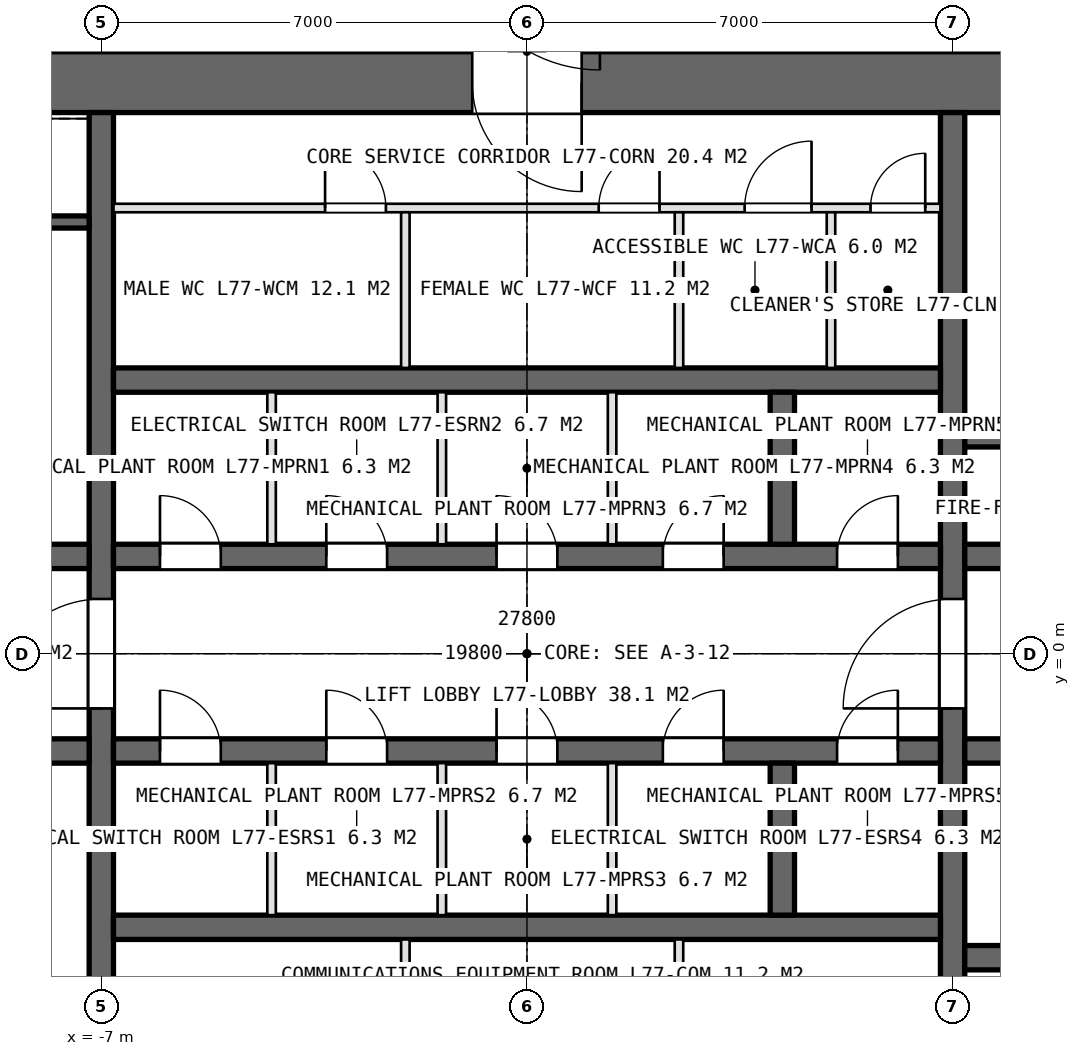
"""IFC4 building model, lengths in metres.
Left out: names, types, materials, properties, quantities, classifications, styles, units other than length and angle.
Written with IfcOpenShell. Run it as: python <this file> out.ifc"""

import sys

from ifc_helpers import new_model, si_unit, direction, frame, frame_2d, origin, place, context, subcontext, project, spatial, rectangle, extrude, element, fill, save


model = new_model("IFC4")
c1 = context("Model", 3, precision=1e-05, world=origin(), true_north=direction((0.0, 1.0)))
c2 = subcontext(c1, "Body", "Model", "MODEL_VIEW")
j1 = project(units=[si_unit("LENGTHUNIT", "METRE"), si_unit("PLANEANGLEUNIT", "RADIAN")], contexts=[c1])
p1 = place(None, origin())
s1 = spatial("IfcSite", under=j1, at=p1, CompositionType="ELEMENT")
p2 = place(p1, origin())
s2 = spatial("IfcBuilding", under=s1, at=p2, CompositionType="ELEMENT")
p3 = place(p2, frame((0.0, 0.0, 344.2)))
s3 = spatial("IfcBuildingStorey", under=s2, at=p3, CompositionType="ELEMENT", Elevation=344.2)
p4 = place(p3, frame((13.9, 9.4, 0.0), z_axis=(0.0, 0.0, 1.0), x_axis=(-1.0, 0.0, 0.0)))
e1 = element("IfcWall", 1, at=p4, inside=s3, PredefinedType="SHEAR", context=c2, shape_type="SweptSolid", body=[
    extrude(rectangle(XDim=27.8, YDim=1.0, at=frame_2d((13.9, 0.0))), origin(), (0.0, 0.0, 1.0), 5.0),
])
p5 = place(p4, frame((23.9, 0.0, 0.0)))
e2 = element("IfcOpeningElement", 2, at=p5, cuts=e1, PredefinedType="OPENING", context=c2, shape_type="SweptSolid", body=[
    extrude(rectangle(XDim=1.0, YDim=2.4, at=frame_2d((0.5, 1.2))), frame((0.0, 0.51, 0.0), z_axis=(0.0, -1.0, 0.0), x_axis=(1.0, 0.0, 0.0)), (0.0, 0.0, 1.0), 1.02),
])
p6 = place(p4, frame((13.0, 0.0, 0.0)))
e3 = element("IfcOpeningElement", 3, at=p6, cuts=e1, PredefinedType="OPENING", context=c2, shape_type="SweptSolid", body=[
    extrude(rectangle(XDim=1.8, YDim=2.4, at=frame_2d((0.9, 1.2))), frame((0.0, 0.51, 0.0), z_axis=(0.0, -1.0, 0.0), x_axis=(1.0, 0.0, 0.0)), (0.0, 0.0, 1.0), 1.02),
])
p7 = place(p3, frame((-7.0, -8.9, 0.0), z_axis=(0.0, 0.0, 1.0), x_axis=(0.0, 1.0, 0.0)))
e4 = element("IfcWall", 4, at=p7, inside=s3, PredefinedType="SHEAR", context=c2, shape_type="SweptSolid", body=[
    extrude(rectangle(XDim=17.8, YDim=0.4, at=frame_2d((8.9, 0.0))), origin(), (0.0, 0.0, 1.0), 5.0),
])
p8 = place(p7, frame((8.0, 0.0, 0.0)))
e5 = element("IfcOpeningElement", 5, at=p8, cuts=e4, PredefinedType="OPENING", context=c2, shape_type="SweptSolid", body=[
    extrude(rectangle(XDim=1.8, YDim=2.4, at=frame_2d((0.9, 1.2))), frame((0.0, 0.21, 0.0), z_axis=(0.0, -1.0, 0.0), x_axis=(1.0, 0.0, 0.0)), (0.0, 0.0, 1.0), 0.42),
])
p9 = place(p3, frame((7.0, -8.9, 0.0), z_axis=(0.0, 0.0, 1.0), x_axis=(0.0, 1.0, 0.0)))
e6 = element("IfcWall", 6, at=p9, inside=s3, PredefinedType="SHEAR", context=c2, shape_type="SweptSolid", body=[
    extrude(rectangle(XDim=17.8, YDim=0.4, at=frame_2d((8.9, 0.0))), origin(), (0.0, 0.0, 1.0), 5.0),
])
p10 = place(p9, frame((8.0, 0.0, 0.0)))
e7 = element("IfcOpeningElement", 7, at=p10, cuts=e6, PredefinedType="OPENING", context=c2, shape_type="SweptSolid", body=[
    extrude(rectangle(XDim=1.8, YDim=2.4, at=frame_2d((0.9, 1.2))), frame((0.0, 0.21, 0.0), z_axis=(0.0, -1.0, 0.0), x_axis=(1.0, 0.0, 0.0)), (0.0, 0.0, 1.0), 0.42),
])
p11 = place(p3, frame((-6.8, 1.6, 0.0), z_axis=(0.0, 0.0, 1.0), x_axis=(1.0, 0.0, 0.0)))
e8 = element("IfcWall", 8, at=p11, inside=s3, PredefinedType="SHEAR", context=c2, shape_type="SweptSolid", body=[
    extrude(rectangle(XDim=13.6, YDim=0.4, at=frame_2d((6.8, 0.0))), origin(), (0.0, 0.0, 1.0), 5.0),
])
p12 = place(p11, frame((0.765, 0.0, 0.0)))
e9 = element("IfcOpeningElement", 9, at=p12, cuts=e8, PredefinedType="OPENING", context=c2, shape_type="SweptSolid", body=[
    extrude(rectangle(XDim=1.0, YDim=2.4, at=frame_2d((0.5, 1.2))), frame((0.0, 0.21, 0.0), z_axis=(0.0, -1.0, 0.0), x_axis=(1.0, 0.0, 0.0)), (0.0, 0.0, 1.0), 0.42),
])
p13 = place(p11, frame((3.5, 0.0, 0.0)))
e10 = element("IfcOpeningElement", 10, at=p13, cuts=e8, PredefinedType="OPENING", context=c2, shape_type="SweptSolid", body=[
    extrude(rectangle(XDim=1.0, YDim=2.4, at=frame_2d((0.5, 1.2))), frame((0.0, 0.21, 0.0), z_axis=(0.0, -1.0, 0.0), x_axis=(1.0, 0.0, 0.0)), (0.0, 0.0, 1.0), 0.42),
])
p14 = place(p11, frame((6.3, 0.0, 0.0)))
e11 = element("IfcOpeningElement", 11, at=p14, cuts=e8, PredefinedType="OPENING", context=c2, shape_type="SweptSolid", body=[
    extrude(rectangle(XDim=1.0, YDim=2.4, at=frame_2d((0.5, 1.2))), frame((0.0, 0.21, 0.0), z_axis=(0.0, -1.0, 0.0), x_axis=(1.0, 0.0, 0.0)), (0.0, 0.0, 1.0), 0.42),
])
p15 = place(p11, frame((9.035, 0.0, 0.0)))
e12 = element("IfcOpeningElement", 12, at=p15, cuts=e8, PredefinedType="OPENING", context=c2, shape_type="SweptSolid", body=[
    extrude(rectangle(XDim=1.0, YDim=2.4, at=frame_2d((0.5, 1.2))), frame((0.0, 0.21, 0.0), z_axis=(0.0, -1.0, 0.0), x_axis=(1.0, 0.0, 0.0)), (0.0, 0.0, 1.0), 0.42),
])
p16 = place(p11, frame((11.9, 0.0, 0.0)))
e13 = element("IfcOpeningElement", 13, at=p16, cuts=e8, PredefinedType="OPENING", context=c2, shape_type="SweptSolid", body=[
    extrude(rectangle(XDim=1.0, YDim=2.4, at=frame_2d((0.5, 1.2))), frame((0.0, 0.21, 0.0), z_axis=(0.0, -1.0, 0.0), x_axis=(1.0, 0.0, 0.0)), (0.0, 0.0, 1.0), 0.42),
])
p17 = place(p3, frame((-6.8, -1.6, 0.0), z_axis=(0.0, 0.0, 1.0), x_axis=(1.0, 0.0, 0.0)))
e14 = element("IfcWall", 14, at=p17, inside=s3, PredefinedType="SHEAR", context=c2, shape_type="SweptSolid", body=[
    extrude(rectangle(XDim=13.6, YDim=0.4, at=frame_2d((6.8, 0.0))), origin(), (0.0, 0.0, 1.0), 5.0),
])
p18 = place(p17, frame((0.765, 0.0, 0.0)))
e15 = element("IfcOpeningElement", 15, at=p18, cuts=e14, PredefinedType="OPENING", context=c2, shape_type="SweptSolid", body=[
    extrude(rectangle(XDim=1.0, YDim=2.4, at=frame_2d((0.5, 1.2))), frame((0.0, 0.21, 0.0), z_axis=(0.0, -1.0, 0.0), x_axis=(1.0, 0.0, 0.0)), (0.0, 0.0, 1.0), 0.42),
])
p19 = place(p17, frame((3.5, 0.0, 0.0)))
e16 = element("IfcOpeningElement", 16, at=p19, cuts=e14, PredefinedType="OPENING", context=c2, shape_type="SweptSolid", body=[
    extrude(rectangle(XDim=1.0, YDim=2.4, at=frame_2d((0.5, 1.2))), frame((0.0, 0.21, 0.0), z_axis=(0.0, -1.0, 0.0), x_axis=(1.0, 0.0, 0.0)), (0.0, 0.0, 1.0), 0.42),
])
p20 = place(p17, frame((6.3, 0.0, 0.0)))
e17 = element("IfcOpeningElement", 17, at=p20, cuts=e14, PredefinedType="OPENING", context=c2, shape_type="SweptSolid", body=[
    extrude(rectangle(XDim=1.0, YDim=2.4, at=frame_2d((0.5, 1.2))), frame((0.0, 0.21, 0.0), z_axis=(0.0, -1.0, 0.0), x_axis=(1.0, 0.0, 0.0)), (0.0, 0.0, 1.0), 0.42),
])
p21 = place(p17, frame((9.035, 0.0, 0.0)))
e18 = element("IfcOpeningElement", 18, at=p21, cuts=e14, PredefinedType="OPENING", context=c2, shape_type="SweptSolid", body=[
    extrude(rectangle(XDim=1.0, YDim=2.4, at=frame_2d((0.5, 1.2))), frame((0.0, 0.21, 0.0), z_axis=(0.0, -1.0, 0.0), x_axis=(1.0, 0.0, 0.0)), (0.0, 0.0, 1.0), 0.42),
])
p22 = place(p17, frame((11.9, 0.0, 0.0)))
e19 = element("IfcOpeningElement", 19, at=p22, cuts=e14, PredefinedType="OPENING", context=c2, shape_type="SweptSolid", body=[
    extrude(rectangle(XDim=1.0, YDim=2.4, at=frame_2d((0.5, 1.2))), frame((0.0, 0.21, 0.0), z_axis=(0.0, -1.0, 0.0), x_axis=(1.0, 0.0, 0.0)), (0.0, 0.0, 1.0), 0.42),
])
for number, where, z_axis, x_axis in (
    (20, (-6.8, 4.5, 0.0), (0.0, 0.0, 1.0), (1.0, 0.0, 0.0)),
    (21, (-6.8, -4.5, 0.0), (0.0, 0.0, 1.0), (1.0, 0.0, 0.0)),
):
    element("IfcWall", number, at=place(p3, frame(where, z_axis=z_axis, x_axis=x_axis)), inside=s3, PredefinedType="SHEAR", context=c2, shape_type="SweptSolid", body=[
        extrude(rectangle(XDim=13.6, YDim=0.4, at=frame_2d((6.8, 0.0))), origin(), (0.0, 0.0, 1.0), 5.0),
    ])
for number, where, z_axis, x_axis in (
    (22, (-12.9, 1.6, 0.0), (0.0, 0.0, 1.0), (1.0, 0.0, 0.0)),
    (23, (-12.9, -1.6, 0.0), (0.0, 0.0, 1.0), (1.0, 0.0, 0.0)),
):
    element("IfcWall", number, at=place(p3, frame(where, z_axis=z_axis, x_axis=x_axis)), inside=s3, PredefinedType="SHEAR", context=c2, shape_type="SweptSolid", body=[
        extrude(rectangle(XDim=5.7, YDim=0.4, at=frame_2d((2.85, 0.0))), origin(), (0.0, 0.0, 1.0), 5.0),
    ])
p23 = place(p3, frame((7.2, 1.6, 0.0), z_axis=(0.0, 0.0, 1.0), x_axis=(1.0, 0.0, 0.0)))
e24 = element("IfcWall", 24, at=p23, inside=s3, PredefinedType="SHEAR", context=c2, shape_type="SweptSolid", body=[
    extrude(rectangle(XDim=5.7, YDim=0.4, at=frame_2d((2.85, 0.0))), origin(), (0.0, 0.0, 1.0), 5.0),
])
p24 = place(p23, frame((0.7, 0.0, 0.0)))
e25 = element("IfcOpeningElement", 25, at=p24, cuts=e24, PredefinedType="OPENING", context=c2, shape_type="SweptSolid", body=[
    extrude(rectangle(XDim=1.0, YDim=2.4, at=frame_2d((0.5, 1.2))), frame((0.0, 0.21, 0.0), z_axis=(0.0, -1.0, 0.0), x_axis=(1.0, 0.0, 0.0)), (0.0, 0.0, 1.0), 0.42),
])
p25 = place(p3, frame((7.2, -1.6, 0.0), z_axis=(0.0, 0.0, 1.0), x_axis=(1.0, 0.0, 0.0)))
e26 = element("IfcWall", 26, at=p25, inside=s3, PredefinedType="SHEAR", context=c2, shape_type="SweptSolid", body=[
    extrude(rectangle(XDim=5.7, YDim=0.4, at=frame_2d((2.85, 0.0))), origin(), (0.0, 0.0, 1.0), 5.0),
])
p26 = place(p25, frame((0.9, 0.0, 0.0)))
e27 = element("IfcOpeningElement", 27, at=p26, cuts=e26, PredefinedType="OPENING", context=c2, shape_type="SweptSolid", body=[
    extrude(rectangle(XDim=1.3, YDim=2.4, at=frame_2d((0.65, 1.2))), frame((0.0, 0.21, 0.0), z_axis=(0.0, -1.0, 0.0), x_axis=(1.0, 0.0, 0.0)), (0.0, 0.0, 1.0), 0.42),
])
p27 = place(p25, frame((3.95, 0.0, 0.0)))
e28 = element("IfcOpeningElement", 28, at=p27, cuts=e26, PredefinedType="OPENING", context=c2, shape_type="SweptSolid", body=[
    extrude(rectangle(XDim=1.3, YDim=2.4, at=frame_2d((0.65, 1.2))), frame((0.0, 0.21, 0.0), z_axis=(0.0, -1.0, 0.0), x_axis=(1.0, 0.0, 0.0)), (0.0, 0.0, 1.0), 0.42),
])
p28 = place(p3, frame((7.2, -5.0, 0.0), z_axis=(0.0, 0.0, 1.0), x_axis=(1.0, 0.0, 0.0)))
e29 = element("IfcWall", 29, at=p28, inside=s3, PredefinedType="SHEAR", context=c2, shape_type="SweptSolid", body=[
    extrude(rectangle(XDim=5.7, YDim=0.4, at=frame_2d((2.85, 0.0))), origin(), (0.0, 0.0, 1.0), 5.0),
])
for number, where, z_axis, x_axis in (
    (30, (4.2, 1.8, 0.0), (0.0, 0.0, 1.0), (0.0, 1.0, 0.0)),
    (31, (4.2, -4.3, 0.0), (0.0, 0.0, 1.0), (0.0, 1.0, 0.0)),
):
    element("IfcWall", number, at=place(p3, frame(where, z_axis=z_axis, x_axis=x_axis)), inside=s3, PredefinedType="SHEAR", context=c2, shape_type="SweptSolid", body=[
        extrude(rectangle(XDim=2.5, YDim=0.4, at=frame_2d((1.25, 0.0))), origin(), (0.0, 0.0, 1.0), 5.0),
    ])
p29 = place(p3, frame((-6.8, 7.33, 0.0), z_axis=(0.0, 0.0, 1.0), x_axis=(1.0, 0.0, 0.0)))
e32 = element("IfcWall", 32, at=p29, inside=s3, PredefinedType="PARTITIONING", context=c2, shape_type="SweptSolid", body=[
    extrude(rectangle(XDim=13.6, YDim=0.14, at=frame_2d((6.8, 0.0))), origin(), (0.0, 0.0, 1.0), 4.7),
])
p30 = place(p29, frame((3.48, 0.0, 0.0)))
e33 = element("IfcOpeningElement", 33, at=p30, cuts=e32, PredefinedType="OPENING", context=c2, shape_type="SweptSolid", body=[
    extrude(rectangle(XDim=1.0, YDim=2.4, at=frame_2d((0.5, 1.2))), frame((0.0, 0.08, 0.0), z_axis=(0.0, -1.0, 0.0), x_axis=(1.0, 0.0, 0.0)), (0.0, 0.0, 1.0), 0.16),
])
p31 = place(p29, frame((7.98, 0.0, 0.0)))
e34 = element("IfcOpeningElement", 34, at=p31, cuts=e32, PredefinedType="OPENING", context=c2, shape_type="SweptSolid", body=[
    extrude(rectangle(XDim=1.0, YDim=2.4, at=frame_2d((0.5, 1.2))), frame((0.0, 0.08, 0.0), z_axis=(0.0, -1.0, 0.0), x_axis=(1.0, 0.0, 0.0)), (0.0, 0.0, 1.0), 0.16),
])
p32 = place(p29, frame((10.38, 0.0, 0.0)))
e35 = element("IfcOpeningElement", 35, at=p32, cuts=e32, PredefinedType="OPENING", context=c2, shape_type="SweptSolid", body=[
    extrude(rectangle(XDim=1.1, YDim=2.4, at=frame_2d((0.55, 1.2))), frame((0.0, 0.08, 0.0), z_axis=(0.0, -1.0, 0.0), x_axis=(1.0, 0.0, 0.0)), (0.0, 0.0, 1.0), 0.16),
])
p33 = place(p29, frame((12.45, 0.0, 0.0)))
e36 = element("IfcOpeningElement", 36, at=p33, cuts=e32, PredefinedType="OPENING", context=c2, shape_type="SweptSolid", body=[
    extrude(rectangle(XDim=0.9, YDim=2.4, at=frame_2d((0.45, 1.2))), frame((0.0, 0.08, 0.0), z_axis=(0.0, -1.0, 0.0), x_axis=(1.0, 0.0, 0.0)), (0.0, 0.0, 1.0), 0.16),
])
for number, where, z_axis, x_axis in (
    (37, (-2.0, 4.7, 0.0), (0.0, 0.0, 1.0), (0.0, 1.0, 0.0)),
    (38, (2.5, 4.7, 0.0), (0.0, 0.0, 1.0), (0.0, 1.0, 0.0)),
    (39, (5.0, 4.7, 0.0), (0.0, 0.0, 1.0), (0.0, 1.0, 0.0)),
    (40, (-2.0, -4.7, 0.0), (0.0, 0.0, 1.0), (0.0, -1.0, 0.0)),
    (41, (2.5, -4.7, 0.0), (0.0, 0.0, 1.0), (0.0, -1.0, 0.0)),
):
    element("IfcWall", number, at=place(p3, frame(where, z_axis=z_axis, x_axis=x_axis)), inside=s3, PredefinedType="PARTITIONING", context=c2, shape_type="SweptSolid", body=[
        extrude(rectangle(XDim=2.56, YDim=0.14, at=frame_2d((1.28, 0.0))), origin(), (0.0, 0.0, 1.0), 4.7),
    ])
for number, where, z_axis, x_axis in (
    (42, (-4.2, 1.8, 0.0), (0.0, 0.0, 1.0), (0.0, 1.0, 0.0)),
    (43, (-1.4, 1.8, 0.0), (0.0, 0.0, 1.0), (0.0, 1.0, 0.0)),
    (44, (1.4, 1.8, 0.0), (0.0, 0.0, 1.0), (0.0, 1.0, 0.0)),
    (45, (-4.2, -1.8, 0.0), (0.0, 0.0, 1.0), (0.0, -1.0, 0.0)),
    (46, (-1.4, -1.8, 0.0), (0.0, 0.0, 1.0), (0.0, -1.0, 0.0)),
    (47, (1.4, -1.8, 0.0), (0.0, 0.0, 1.0), (0.0, -1.0, 0.0)),
):
    element("IfcWall", number, at=place(p3, frame(where, z_axis=z_axis, x_axis=x_axis)), inside=s3, PredefinedType="PARTITIONING", context=c2, shape_type="SweptSolid", body=[
        extrude(rectangle(XDim=2.5, YDim=0.14, at=frame_2d((1.25, 0.0))), origin(), (0.0, 0.0, 1.0), 4.7),
    ])
for number, where, z_axis, x_axis in (
    (48, (-9.15, 7.1, 0.0), (0.0, 0.0, 1.0), (1.0, 0.0, 0.0)),
    (49, (9.15, 3.5, 0.0), (0.0, 0.0, 1.0), (-1.0, 0.0, 0.0)),
):
    element("IfcWall", number, at=place(p3, frame(where, z_axis=z_axis, x_axis=x_axis)), inside=s3, PredefinedType="SOLIDWALL", context=c2, shape_type="SweptSolid", body=[
        extrude(rectangle(XDim=1.95, YDim=0.2, at=frame_2d((0.975, 0.0))), origin(), (0.0, 0.0, 1.0), 5.0),
    ])
p34 = place(p8, origin())
e50 = element("IfcDoor", 50, at=p34, inside=s3, OperationType="DOUBLE_DOOR_SINGLE_SWING", PredefinedType="DOOR", context=c2, shape_type="SweptSolid", body=[
    extrude(rectangle(XDim=1.8, YDim=2.4, at=frame_2d((0.9, 1.2))), frame((0.0, 0.025, 0.0), z_axis=(0.0, -1.0, 0.0), x_axis=(1.0, 0.0, 0.0)), (0.0, 0.0, 1.0), 0.05),
])
fill(e5, e50)
p35 = place(p10, origin())
e51 = element("IfcDoor", 51, at=p35, inside=s3, OperationType="DOUBLE_DOOR_SINGLE_SWING", PredefinedType="DOOR", context=c2, shape_type="SweptSolid", body=[
    extrude(rectangle(XDim=1.8, YDim=2.4, at=frame_2d((0.9, 1.2))), frame((0.0, 0.025, 0.0), z_axis=(0.0, -1.0, 0.0), x_axis=(1.0, 0.0, 0.0)), (0.0, 0.0, 1.0), 0.05),
])
fill(e7, e51)
p36 = place(p30, origin())
e52 = element("IfcDoor", 52, at=p36, inside=s3, OperationType="SINGLE_SWING_LEFT", PredefinedType="DOOR", context=c2, shape_type="SweptSolid", body=[
    extrude(rectangle(XDim=1.0, YDim=2.4, at=frame_2d((0.5, 1.2))), frame((0.0, 0.025, 0.0), z_axis=(0.0, -1.0, 0.0), x_axis=(1.0, 0.0, 0.0)), (0.0, 0.0, 1.0), 0.05),
])
fill(e33, e52)
p37 = place(p31, origin())
e53 = element("IfcDoor", 53, at=p37, inside=s3, OperationType="SINGLE_SWING_RIGHT", PredefinedType="DOOR", context=c2, shape_type="SweptSolid", body=[
    extrude(rectangle(XDim=1.0, YDim=2.4, at=frame_2d((0.5, 1.2))), frame((0.0, 0.025, 0.0), z_axis=(0.0, -1.0, 0.0), x_axis=(1.0, 0.0, 0.0)), (0.0, 0.0, 1.0), 0.05),
])
fill(e34, e53)
p38 = place(p32, origin())
e54 = element("IfcDoor", 54, at=p38, inside=s3, OperationType="SINGLE_SWING_RIGHT", PredefinedType="DOOR", context=c2, shape_type="SweptSolid", body=[
    extrude(rectangle(XDim=1.1, YDim=2.4, at=frame_2d((0.55, 1.2))), frame((0.0, 0.025, 0.0), z_axis=(0.0, -1.0, 0.0), x_axis=(1.0, 0.0, 0.0)), (0.0, 0.0, 1.0), 0.05),
])
fill(e35, e54)
p39 = place(p33, origin())
e55 = element("IfcDoor", 55, at=p39, inside=s3, OperationType="SINGLE_SWING_RIGHT", PredefinedType="DOOR", context=c2, shape_type="SweptSolid", body=[
    extrude(rectangle(XDim=0.9, YDim=2.4, at=frame_2d((0.45, 1.2))), frame((0.0, 0.025, 0.0), z_axis=(0.0, -1.0, 0.0), x_axis=(1.0, 0.0, 0.0)), (0.0, 0.0, 1.0), 0.05),
])
fill(e36, e55)
p40 = place(p12, origin())
e56 = element("IfcDoor", 56, at=p40, inside=s3, OperationType="SINGLE_SWING_LEFT", PredefinedType="DOOR", context=c2, shape_type="SweptSolid", body=[
    extrude(rectangle(XDim=1.0, YDim=2.4, at=frame_2d((0.5, 1.2))), frame((0.0, 0.025, 0.0), z_axis=(0.0, -1.0, 0.0), x_axis=(1.0, 0.0, 0.0)), (0.0, 0.0, 1.0), 0.05),
])
fill(e9, e56)
p41 = place(p13, origin())
e57 = element("IfcDoor", 57, at=p41, inside=s3, OperationType="SINGLE_SWING_LEFT", PredefinedType="DOOR", context=c2, shape_type="SweptSolid", body=[
    extrude(rectangle(XDim=1.0, YDim=2.4, at=frame_2d((0.5, 1.2))), frame((0.0, 0.025, 0.0), z_axis=(0.0, -1.0, 0.0), x_axis=(1.0, 0.0, 0.0)), (0.0, 0.0, 1.0), 0.05),
])
fill(e10, e57)
p42 = place(p14, origin())
e58 = element("IfcDoor", 58, at=p42, inside=s3, OperationType="SINGLE_SWING_LEFT", PredefinedType="DOOR", context=c2, shape_type="SweptSolid", body=[
    extrude(rectangle(XDim=1.0, YDim=2.4, at=frame_2d((0.5, 1.2))), frame((0.0, 0.025, 0.0), z_axis=(0.0, -1.0, 0.0), x_axis=(1.0, 0.0, 0.0)), (0.0, 0.0, 1.0), 0.05),
])
fill(e11, e58)
p43 = place(p15, origin())
e59 = element("IfcDoor", 59, at=p43, inside=s3, OperationType="SINGLE_SWING_RIGHT", PredefinedType="DOOR", context=c2, shape_type="SweptSolid", body=[
    extrude(rectangle(XDim=1.0, YDim=2.4, at=frame_2d((0.5, 1.2))), frame((0.0, 0.025, 0.0), z_axis=(0.0, -1.0, 0.0), x_axis=(1.0, 0.0, 0.0)), (0.0, 0.0, 1.0), 0.05),
])
fill(e12, e59)
p44 = place(p18, origin())
e60 = element("IfcDoor", 60, at=p44, inside=s3, OperationType="SINGLE_SWING_LEFT", PredefinedType="DOOR", context=c2, shape_type="SweptSolid", body=[
    extrude(rectangle(XDim=1.0, YDim=2.4, at=frame_2d((0.5, 1.2))), frame((0.0, 0.025, 0.0), z_axis=(0.0, -1.0, 0.0), x_axis=(1.0, 0.0, 0.0)), (0.0, 0.0, 1.0), 0.05),
])
fill(e15, e60)
p45 = place(p19, origin())
e61 = element("IfcDoor", 61, at=p45, inside=s3, OperationType="SINGLE_SWING_LEFT", PredefinedType="DOOR", context=c2, shape_type="SweptSolid", body=[
    extrude(rectangle(XDim=1.0, YDim=2.4, at=frame_2d((0.5, 1.2))), frame((0.0, 0.025, 0.0), z_axis=(0.0, -1.0, 0.0), x_axis=(1.0, 0.0, 0.0)), (0.0, 0.0, 1.0), 0.05),
])
fill(e16, e61)
p46 = place(p20, origin())
e62 = element("IfcDoor", 62, at=p46, inside=s3, OperationType="SINGLE_SWING_LEFT", PredefinedType="DOOR", context=c2, shape_type="SweptSolid", body=[
    extrude(rectangle(XDim=1.0, YDim=2.4, at=frame_2d((0.5, 1.2))), frame((0.0, 0.025, 0.0), z_axis=(0.0, -1.0, 0.0), x_axis=(1.0, 0.0, 0.0)), (0.0, 0.0, 1.0), 0.05),
])
fill(e17, e62)
p47 = place(p21, origin())
e63 = element("IfcDoor", 63, at=p47, inside=s3, OperationType="SINGLE_SWING_RIGHT", PredefinedType="DOOR", context=c2, shape_type="SweptSolid", body=[
    extrude(rectangle(XDim=1.0, YDim=2.4, at=frame_2d((0.5, 1.2))), frame((0.0, 0.025, 0.0), z_axis=(0.0, -1.0, 0.0), x_axis=(1.0, 0.0, 0.0)), (0.0, 0.0, 1.0), 0.05),
])
fill(e18, e63)
p48 = place(p16, origin())
e64 = element("IfcDoor", 64, at=p48, inside=s3, OperationType="SINGLE_SWING_RIGHT", PredefinedType="DOOR", context=c2, shape_type="SweptSolid", body=[
    extrude(rectangle(XDim=1.0, YDim=2.4, at=frame_2d((0.5, 1.2))), frame((0.0, 0.025, 0.0), z_axis=(0.0, -1.0, 0.0), x_axis=(1.0, 0.0, 0.0)), (0.0, 0.0, 1.0), 0.05),
])
fill(e13, e64)
p49 = place(p22, origin())
e65 = element("IfcDoor", 65, at=p49, inside=s3, OperationType="SINGLE_SWING_RIGHT", PredefinedType="DOOR", context=c2, shape_type="SweptSolid", body=[
    extrude(rectangle(XDim=1.0, YDim=2.4, at=frame_2d((0.5, 1.2))), frame((0.0, 0.025, 0.0), z_axis=(0.0, -1.0, 0.0), x_axis=(1.0, 0.0, 0.0)), (0.0, 0.0, 1.0), 0.05),
])
fill(e19, e65)
p50 = place(p6, origin())
e66 = element("IfcDoor", 66, at=p50, inside=s3, OperationType="DOUBLE_DOOR_SINGLE_SWING", PredefinedType="DOOR", context=c2, shape_type="SweptSolid", body=[
    extrude(rectangle(XDim=1.8, YDim=2.4, at=frame_2d((0.9, 1.2))), frame((0.0, 0.025, 0.0), z_axis=(0.0, -1.0, 0.0), x_axis=(1.0, 0.0, 0.0)), (0.0, 0.0, 1.0), 0.05),
])
fill(e3, e66)
save(model, sys.argv[1])
